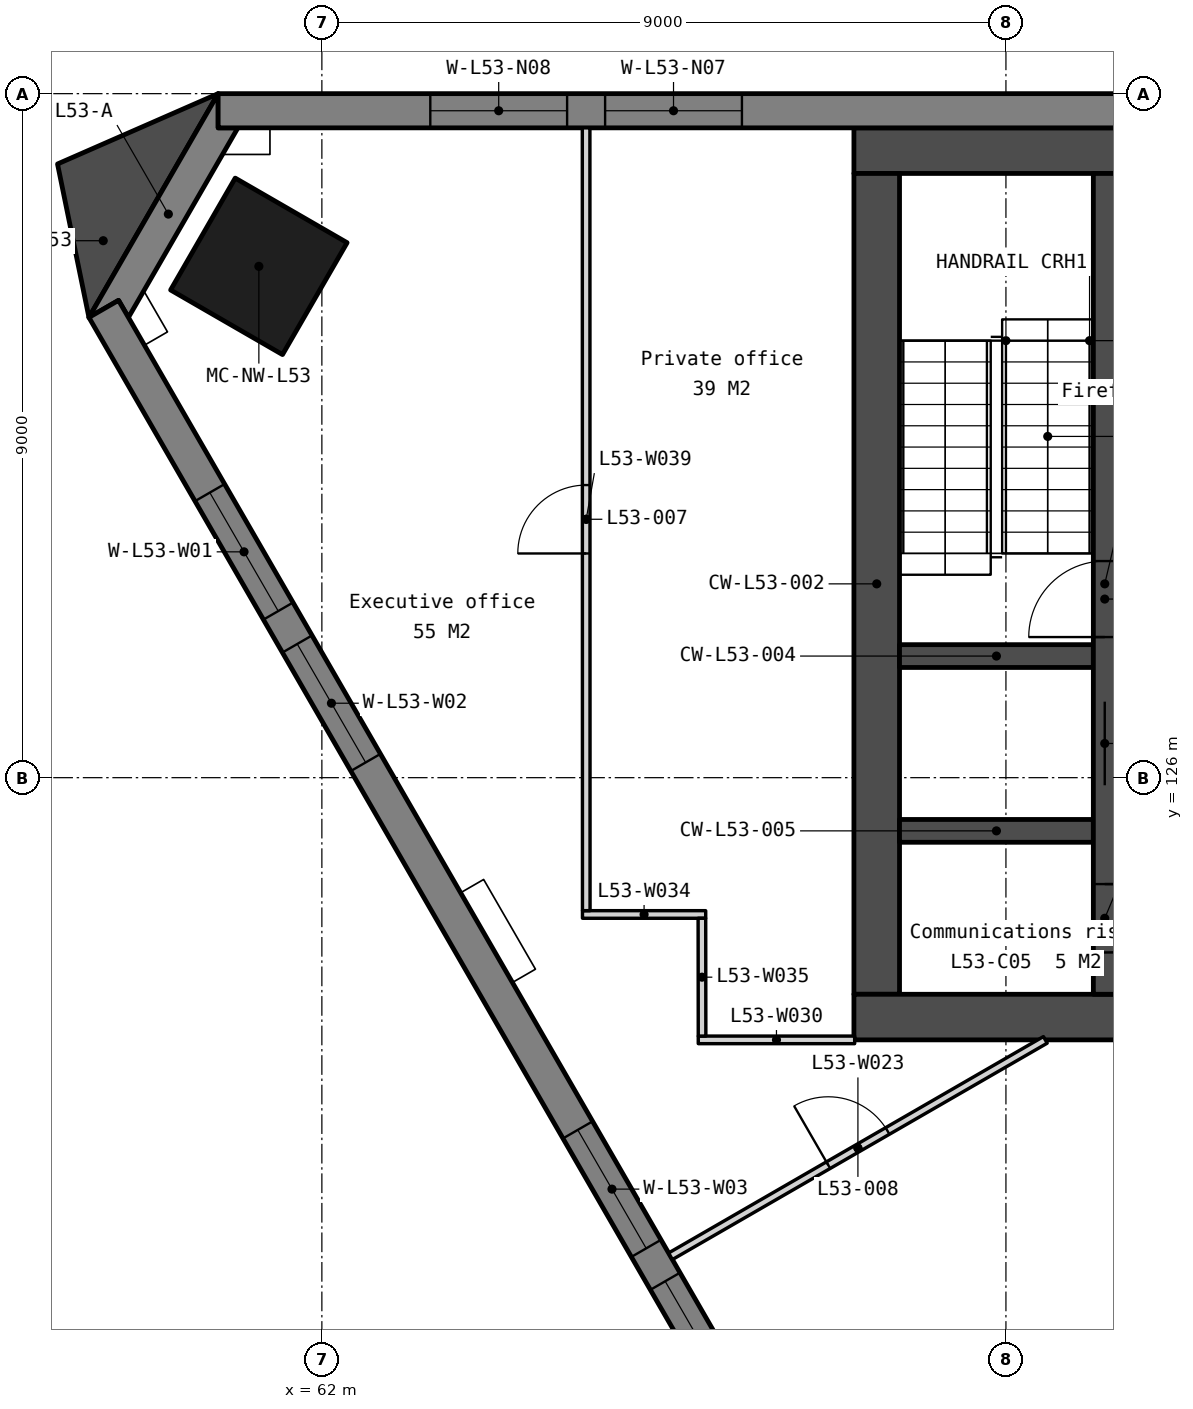
"""IFC4 building model, lengths in metres.
Left out: names, types, materials, properties, quantities, classifications, styles, units other than length and angle.
Written with IfcOpenShell. Run it as: python <this file> out.ifc"""

import sys

from ifc_helpers import new_model, si_unit, direction, frame, frame_2d, origin, origin_2d, place, context, subcontext, project, spatial, polyline, rectangle, outline, extrude, element, fill, save


model = new_model("IFC4")
c1 = context("Model", 3, precision=1e-05, world=origin(), true_north=direction((0.0, 1.0)))
c2 = subcontext(c1, "Body", "Model", "MODEL_VIEW")
j1 = project(units=[si_unit("LENGTHUNIT", "METRE"), si_unit("PLANEANGLEUNIT", "RADIAN")], contexts=[c1])
p1 = place(None, origin())
s1 = spatial("IfcSite", under=j1, at=p1, CompositionType="ELEMENT")
p2 = place(p1, origin())
s2 = spatial("IfcBuilding", under=s1, at=p2, CompositionType="ELEMENT")
p3 = place(p2, frame((0.0, 0.0, 211.4)))
s3 = spatial("IfcBuildingStorey", under=s2, at=p3, CompositionType="ELEMENT", Elevation=211.4)
p4 = place(p3, frame((61.171, 132.728, 0.0), z_axis=(0.0, 0.0, 1.0), x_axis=(-0.5, -0.866025403784, 0.0)))
e1 = element("IfcColumn", 1, at=p4, inside=s3, PredefinedType="COLUMN", context=c2, shape_type="SweptSolid", body=[
    extrude(rectangle(XDim=1.7, YDim=1.7, at=origin_2d()), origin(), (0.0, 0.0, 1.0), 3.9),
])
p5 = place(p3, frame((69.0, 134.25, 0.0), z_axis=(0.0, 0.0, 1.0), x_axis=(1.0, 0.0, 0.0)))
e2 = element("IfcWall", 2, at=p5, inside=s3, PredefinedType="SOLIDWALL", context=c2, shape_type="SweptSolid", body=[
    extrude(rectangle(XDim=22.0, YDim=0.6, at=frame_2d((11.0, 0.0))), origin(), (0.0, 0.0, 1.0), 3.75),
])
p6 = place(p3, frame((69.3, 133.95, 0.0), z_axis=(0.0, 0.0, 1.0), x_axis=(0.0, -1.0, 0.0)))
e3 = element("IfcWall", 3, at=p6, inside=s3, PredefinedType="SOLIDWALL", context=c2, shape_type="SweptSolid", body=[
    extrude(rectangle(XDim=10.8, YDim=0.6, at=frame_2d((5.4, 0.0))), origin(), (0.0, 0.0, 1.0), 3.75),
])
p7 = place(p3, frame((69.0, 122.85, 0.0), z_axis=(0.0, 0.0, 1.0), x_axis=(1.0, 0.0, 0.0)))
e4 = element("IfcWall", 4, at=p7, inside=s3, PredefinedType="SOLIDWALL", context=c2, shape_type="SweptSolid", body=[
    extrude(rectangle(XDim=22.0, YDim=0.6, at=frame_2d((11.0, 0.0))), origin(), (0.0, 0.0, 1.0), 3.75),
])
p8 = place(p7, frame((16.375, 0.0, 0.0)))
e5 = element("IfcOpeningElement", 5, at=p8, cuts=e4, PredefinedType="OPENING", context=c2, shape_type="SweptSolid", body=[
    extrude(rectangle(XDim=1.8, YDim=2.1, at=frame_2d((0.9, 1.05))), frame((0.0, 0.31, 0.0), z_axis=(0.0, -1.0, 0.0), x_axis=(1.0, 0.0, 0.0)), (0.0, 0.0, 1.0), 0.62),
])
p9 = place(p7, frame((3.825, 0.0, 0.0)))
e6 = element("IfcOpeningElement", 6, at=p9, cuts=e4, PredefinedType="OPENING", context=c2, shape_type="SweptSolid", body=[
    extrude(rectangle(XDim=1.8, YDim=2.1, at=frame_2d((0.9, 1.05))), frame((0.0, 0.31, 0.0), z_axis=(0.0, -1.0, 0.0), x_axis=(1.0, 0.0, 0.0)), (0.0, 0.0, 1.0), 0.62),
])
p10 = place(p7, frame((12.85, 0.0, 0.0)))
e7 = element("IfcOpeningElement", 7, at=p10, cuts=e4, PredefinedType="OPENING", context=c2, shape_type="SweptSolid", body=[
    extrude(rectangle(XDim=1.5, YDim=2.1, at=frame_2d((0.75, 1.05))), frame((0.0, 0.31, 0.0), z_axis=(0.0, -1.0, 0.0), x_axis=(1.0, 0.0, 0.0)), (0.0, 0.0, 1.0), 0.62),
])
for number, where, z_axis, x_axis in (
    (8, (69.6, 127.6, 0.0), (0.0, 0.0, 1.0), (1.0, 0.0, 0.0)),
    (9, (69.6, 125.3, 0.0), (0.0, 0.0, 1.0), (1.0, 0.0, 0.0)),
):
    element("IfcWall", number, at=place(p3, frame(where, z_axis=z_axis, x_axis=x_axis)), inside=s3, PredefinedType="SOLIDWALL", context=c2, shape_type="SweptSolid", body=[
        extrude(rectangle(XDim=2.55, YDim=0.3, at=frame_2d((1.275, 0.0))), origin(), (0.0, 0.0, 1.0), 3.75),
    ])
p11 = place(p3, frame((72.3, 133.95, 0.0), z_axis=(0.0, 0.0, 1.0), x_axis=(0.0, -1.0, 0.0)))
e10 = element("IfcWall", 10, at=p11, inside=s3, PredefinedType="SOLIDWALL", context=c2, shape_type="SweptSolid", body=[
    extrude(rectangle(XDim=10.8, YDim=0.3, at=frame_2d((5.4, 0.0))), origin(), (0.0, 0.0, 1.0), 3.75),
])
p12 = place(p11, frame((6.95, 0.0, 0.0)))
e11 = element("IfcOpeningElement", 11, at=p12, cuts=e10, PredefinedType="OPENING", context=c2, shape_type="SweptSolid", body=[
    extrude(rectangle(XDim=1.1, YDim=2.1, at=frame_2d((0.55, 1.05))), frame((0.0, 0.16, 0.0), z_axis=(0.0, -1.0, 0.0), x_axis=(1.0, 0.0, 0.0)), (0.0, 0.0, 1.0), 0.32),
])
p13 = place(p11, frame((9.35, 0.0, 0.0)))
e12 = element("IfcOpeningElement", 12, at=p13, cuts=e10, PredefinedType="OPENING", context=c2, shape_type="SweptSolid", body=[
    extrude(rectangle(XDim=0.9, YDim=2.1, at=frame_2d((0.45, 1.05))), frame((0.0, 0.16, 0.0), z_axis=(0.0, -1.0, 0.0), x_axis=(1.0, 0.0, 0.0)), (0.0, 0.0, 1.0), 0.32),
])
p14 = place(p11, frame((5.1, 0.0, 0.0)))
e13 = element("IfcOpeningElement", 13, at=p14, cuts=e10, PredefinedType="OPENING", context=c2, shape_type="SweptSolid", body=[
    extrude(rectangle(XDim=1.0, YDim=2.1, at=frame_2d((0.5, 1.05))), frame((0.0, 0.16, 0.0), z_axis=(0.0, -1.0, 0.0), x_axis=(1.0, 0.0, 0.0)), (0.0, 0.0, 1.0), 0.32),
])
p15 = place(p3, frame((0.0, 0.0, -0.15)))
e14 = element("IfcWall", 14, at=p15, inside=s3, PredefinedType="SOLIDWALL", context=c2, shape_type="SweptSolid", body=[
    extrude(outline(polyline([(60.635, 135.0), (60.635, 134.55), (60.895, 134.55), (59.455, 132.055), (59.325, 132.281), (58.935, 132.055), (60.635, 135.0)])), origin(), (0.0, 0.0, 1.0), 3.9),
])
p16 = place(p3, frame((99.365, 134.775, -0.15), z_axis=(0.0, 0.0, 1.0), x_axis=(-1.0, 0.0, 0.0)))
e15 = element("IfcWall", 15, at=p16, inside=s3, PredefinedType="SOLIDWALL", context=c2, shape_type="SweptSolid", body=[
    extrude(outline(polyline([(38.729, 0.0), (38.729, 3.9), (0.0, 3.9), (0.0, 0.0), (38.729, 0.0)])), frame((0.0, 0.225, 0.0), z_axis=(0.0, -1.0, 0.0), x_axis=(1.0, 0.0, 0.0)), (0.0, 0.0, 1.0), 0.45),
])
p17 = place(p16, frame((2.791, 0.0, 0.95)))
e16 = element("IfcOpeningElement", 16, at=p17, cuts=e15, PredefinedType="OPENING", context=c2, shape_type="SweptSolid", body=[
    extrude(rectangle(XDim=1.8, YDim=2.2, at=frame_2d((0.9, 1.1))), frame((0.0, 0.235, 0.0), z_axis=(0.0, -1.0, 0.0), x_axis=(1.0, 0.0, 0.0)), (0.0, 0.0, 1.0), 0.47),
])
p18 = place(p16, frame((5.091, 0.0, 0.95)))
e17 = element("IfcOpeningElement", 17, at=p18, cuts=e15, PredefinedType="OPENING", context=c2, shape_type="SweptSolid", body=[
    extrude(rectangle(XDim=1.8, YDim=2.2, at=frame_2d((0.9, 1.1))), frame((0.0, 0.235, 0.0), z_axis=(0.0, -1.0, 0.0), x_axis=(1.0, 0.0, 0.0)), (0.0, 0.0, 1.0), 0.47),
])
p19 = place(p16, frame((12.473, 0.0, 0.95)))
e18 = element("IfcOpeningElement", 18, at=p19, cuts=e15, PredefinedType="OPENING", context=c2, shape_type="SweptSolid", body=[
    extrude(rectangle(XDim=1.8, YDim=2.2, at=frame_2d((0.9, 1.1))), frame((0.0, 0.235, 0.0), z_axis=(0.0, -1.0, 0.0), x_axis=(1.0, 0.0, 0.0)), (0.0, 0.0, 1.0), 0.47),
])
p20 = place(p16, frame((14.773, 0.0, 0.95)))
e19 = element("IfcOpeningElement", 19, at=p20, cuts=e15, PredefinedType="OPENING", context=c2, shape_type="SweptSolid", body=[
    extrude(rectangle(XDim=1.8, YDim=2.2, at=frame_2d((0.9, 1.1))), frame((0.0, 0.235, 0.0), z_axis=(0.0, -1.0, 0.0), x_axis=(1.0, 0.0, 0.0)), (0.0, 0.0, 1.0), 0.47),
])
p21 = place(p16, frame((22.156, 0.0, 0.95)))
e20 = element("IfcOpeningElement", 20, at=p21, cuts=e15, PredefinedType="OPENING", context=c2, shape_type="SweptSolid", body=[
    extrude(rectangle(XDim=1.8, YDim=2.2, at=frame_2d((0.9, 1.1))), frame((0.0, 0.235, 0.0), z_axis=(0.0, -1.0, 0.0), x_axis=(1.0, 0.0, 0.0)), (0.0, 0.0, 1.0), 0.47),
])
p22 = place(p16, frame((24.456, 0.0, 0.95)))
e21 = element("IfcOpeningElement", 21, at=p22, cuts=e15, PredefinedType="OPENING", context=c2, shape_type="SweptSolid", body=[
    extrude(rectangle(XDim=1.8, YDim=2.2, at=frame_2d((0.9, 1.1))), frame((0.0, 0.235, 0.0), z_axis=(0.0, -1.0, 0.0), x_axis=(1.0, 0.0, 0.0)), (0.0, 0.0, 1.0), 0.47),
])
p23 = place(p16, frame((31.838, 0.0, 0.95)))
e22 = element("IfcOpeningElement", 22, at=p23, cuts=e15, PredefinedType="OPENING", context=c2, shape_type="SweptSolid", body=[
    extrude(rectangle(XDim=1.8, YDim=2.2, at=frame_2d((0.9, 1.1))), frame((0.0, 0.235, 0.0), z_axis=(0.0, -1.0, 0.0), x_axis=(1.0, 0.0, 0.0)), (0.0, 0.0, 1.0), 0.47),
])
p24 = place(p16, frame((34.138, 0.0, 0.95)))
e23 = element("IfcOpeningElement", 23, at=p24, cuts=e15, PredefinedType="OPENING", context=c2, shape_type="SweptSolid", body=[
    extrude(rectangle(XDim=1.8, YDim=2.2, at=frame_2d((0.9, 1.1))), frame((0.0, 0.235, 0.0), z_axis=(0.0, -1.0, 0.0), x_axis=(1.0, 0.0, 0.0)), (0.0, 0.0, 1.0), 0.47),
])
p25 = place(p3, frame((59.13, 132.168, -0.15), z_axis=(0.0, 0.0, 1.0), x_axis=(0.500002199942, -0.866024133644, 0.0)))
e24 = element("IfcWall", 24, at=p25, inside=s3, PredefinedType="SOLIDWALL", context=c2, shape_type="SweptSolid", body=[
    extrude(outline(polyline([(38.729, 0.0), (38.729, 3.9), (0.0, 3.9), (0.0, 0.0), (38.729, 0.0)])), frame((0.0, 0.225, 0.0), z_axis=(0.0, -1.0, 0.0), x_axis=(1.0, 0.0, 0.0)), (0.0, 0.0, 1.0), 0.45),
])
p26 = place(p25, frame((2.791, 0.0, 0.95)))
e25 = element("IfcOpeningElement", 25, at=p26, cuts=e24, PredefinedType="OPENING", context=c2, shape_type="SweptSolid", body=[
    extrude(rectangle(XDim=1.8, YDim=2.2, at=frame_2d((0.9, 1.1))), frame((0.0, 0.235, 0.0), z_axis=(0.0, -1.0, 0.0), x_axis=(1.0, 0.0, 0.0)), (0.0, 0.0, 1.0), 0.47),
])
p27 = place(p25, frame((5.091, 0.0, 0.95)))
e26 = element("IfcOpeningElement", 26, at=p27, cuts=e24, PredefinedType="OPENING", context=c2, shape_type="SweptSolid", body=[
    extrude(rectangle(XDim=1.8, YDim=2.2, at=frame_2d((0.9, 1.1))), frame((0.0, 0.235, 0.0), z_axis=(0.0, -1.0, 0.0), x_axis=(1.0, 0.0, 0.0)), (0.0, 0.0, 1.0), 0.47),
])
p28 = place(p25, frame((12.473, 0.0, 0.95)))
e27 = element("IfcOpeningElement", 27, at=p28, cuts=e24, PredefinedType="OPENING", context=c2, shape_type="SweptSolid", body=[
    extrude(rectangle(XDim=1.8, YDim=2.2, at=frame_2d((0.9, 1.1))), frame((0.0, 0.235, 0.0), z_axis=(0.0, -1.0, 0.0), x_axis=(1.0, 0.0, 0.0)), (0.0, 0.0, 1.0), 0.47),
])
p29 = place(p25, frame((14.773, 0.0, 0.95)))
e28 = element("IfcOpeningElement", 28, at=p29, cuts=e24, PredefinedType="OPENING", context=c2, shape_type="SweptSolid", body=[
    extrude(rectangle(XDim=1.8, YDim=2.2, at=frame_2d((0.9, 1.1))), frame((0.0, 0.235, 0.0), z_axis=(0.0, -1.0, 0.0), x_axis=(1.0, 0.0, 0.0)), (0.0, 0.0, 1.0), 0.47),
])
p30 = place(p25, frame((22.156, 0.0, 0.95)))
e29 = element("IfcOpeningElement", 29, at=p30, cuts=e24, PredefinedType="OPENING", context=c2, shape_type="SweptSolid", body=[
    extrude(rectangle(XDim=1.8, YDim=2.2, at=frame_2d((0.9, 1.1))), frame((0.0, 0.235, 0.0), z_axis=(0.0, -1.0, 0.0), x_axis=(1.0, 0.0, 0.0)), (0.0, 0.0, 1.0), 0.47),
])
p31 = place(p25, frame((24.456, 0.0, 0.95)))
e30 = element("IfcOpeningElement", 30, at=p31, cuts=e24, PredefinedType="OPENING", context=c2, shape_type="SweptSolid", body=[
    extrude(rectangle(XDim=1.8, YDim=2.2, at=frame_2d((0.9, 1.1))), frame((0.0, 0.235, 0.0), z_axis=(0.0, -1.0, 0.0), x_axis=(1.0, 0.0, 0.0)), (0.0, 0.0, 1.0), 0.47),
])
p32 = place(p25, frame((31.838, 0.0, 0.95)))
e31 = element("IfcOpeningElement", 31, at=p32, cuts=e24, PredefinedType="OPENING", context=c2, shape_type="SweptSolid", body=[
    extrude(rectangle(XDim=1.8, YDim=2.2, at=frame_2d((0.9, 1.1))), frame((0.0, 0.235, 0.0), z_axis=(0.0, -1.0, 0.0), x_axis=(1.0, 0.0, 0.0)), (0.0, 0.0, 1.0), 0.47),
])
p33 = place(p25, frame((34.138, 0.0, 0.95)))
e32 = element("IfcOpeningElement", 32, at=p33, cuts=e24, PredefinedType="OPENING", context=c2, shape_type="SweptSolid", body=[
    extrude(rectangle(XDim=1.8, YDim=2.2, at=frame_2d((0.9, 1.1))), frame((0.0, 0.235, 0.0), z_axis=(0.0, -1.0, 0.0), x_axis=(1.0, 0.0, 0.0)), (0.0, 0.0, 1.0), 0.47),
])
p34 = place(p3, frame((0.0, 0.0, -0.15)))
e33 = element("IfcWall", 33, at=p34, inside=s3, PredefinedType="SOLIDWALL", context=c2, shape_type="SweptSolid", body=[
    extrude(outline(polyline([(60.635, 135.0), (58.522, 134.075), (58.935, 132.055), (60.635, 135.0)])), origin(), (0.0, 0.0, 1.0), 3.9),
])
p35 = place(p3, frame((69.007, 115.51, 0.0), z_axis=(0.0, 0.0, 1.0), x_axis=(0.866033739143, 0.499985562458, 0.0)))
e34 = element("IfcWall", 34, at=p35, inside=s3, PredefinedType="PARTITIONING", context=c2, shape_type="SweptSolid", body=[
    extrude(rectangle(XDim=8.594, YDim=0.2, at=frame_2d((4.297, 0.0))), origin(), (0.0, 0.0, 1.0), 3.75),
])
p36 = place(p3, frame((66.587, 119.703, 0.0), z_axis=(0.0, 0.0, 1.0), x_axis=(0.866023511746, 0.500003277092, 0.0)))
e35 = element("IfcWall", 35, at=p36, inside=s3, PredefinedType="PARTITIONING", context=c2, shape_type="SweptSolid", body=[
    extrude(rectangle(XDim=5.694, YDim=0.1, at=frame_2d((2.847, 0.0))), origin(), (0.0, 0.0, 1.0), 3.75),
])
p37 = place(p36, frame((2.397, 0.0, 0.0)))
e36 = element("IfcOpeningElement", 36, at=p37, cuts=e35, PredefinedType="OPENING", context=c2, shape_type="SweptSolid", body=[
    extrude(rectangle(XDim=0.9, YDim=2.1, at=frame_2d((0.45, 1.05))), frame((0.0, 0.06, 0.0), z_axis=(0.0, -1.0, 0.0), x_axis=(1.0, 0.0, 0.0)), (0.0, 0.0, 1.0), 0.12),
])
p38 = place(p3, frame((66.952, 122.55, 0.0), z_axis=(0.0, 0.0, 1.0), x_axis=(1.0, 0.0, 0.0)))
e37 = element("IfcWall", 37, at=p38, inside=s3, PredefinedType="PARTITIONING", context=c2, shape_type="SweptSolid", body=[
    extrude(rectangle(XDim=2.058, YDim=0.1, at=frame_2d((1.029, 0.0))), origin(), (0.0, 0.0, 1.0), 3.75),
])
p39 = place(p3, frame((65.428, 124.2, 0.0), z_axis=(0.0, 0.0, 1.0), x_axis=(1.0, 0.0, 0.0)))
e38 = element("IfcWall", 38, at=p39, inside=s3, PredefinedType="PARTITIONING", context=c2, shape_type="SweptSolid", body=[
    extrude(rectangle(XDim=1.622, YDim=0.1, at=frame_2d((0.811, 0.0))), origin(), (0.0, 0.0, 1.0), 3.28),
])
p40 = place(p3, frame((67.002, 122.6, 0.0), z_axis=(0.0, 0.0, 1.0), x_axis=(-0.001260238445, 0.999999205899, 0.0)))
e39 = element("IfcWall", 39, at=p40, inside=s3, PredefinedType="PARTITIONING", context=c2, shape_type="SweptSolid", body=[
    extrude(rectangle(XDim=1.55, YDim=0.1, at=frame_2d((0.775, 0.0))), origin(), (0.0, 0.0, 1.0), 3.75),
])
p41 = place(p3, frame((65.479, 124.25, 0.0), z_axis=(0.0, 0.0, 1.0), x_axis=(-0.000189622884, 0.999999982022, 0.0)))
e40 = element("IfcWall", 40, at=p41, inside=s3, PredefinedType="PARTITIONING", context=c2, shape_type="SweptSolid", body=[
    extrude(rectangle(XDim=10.3, YDim=0.1, at=frame_2d((5.15, 0.0))), origin(), (0.0, 0.0, 1.0), 3.75),
])
p42 = place(p41, frame((4.7, 0.0, 0.0)))
e41 = element("IfcOpeningElement", 41, at=p42, cuts=e40, PredefinedType="OPENING", context=c2, shape_type="SweptSolid", body=[
    extrude(rectangle(XDim=0.9, YDim=2.1, at=frame_2d((0.45, 1.05))), frame((0.0, 0.06, 0.0), z_axis=(0.0, -1.0, 0.0), x_axis=(1.0, 0.0, 0.0)), (0.0, 0.0, 1.0), 0.12),
])
p43 = place(p12, origin())
e42 = element("IfcDoor", 42, at=p43, inside=s3, OperationType="SLIDING_TO_LEFT", PredefinedType="DOOR", context=c2, shape_type="SweptSolid", body=[
    extrude(rectangle(XDim=1.1, YDim=2.1, at=frame_2d((0.55, 1.05))), frame((0.0, 0.025, 0.0), z_axis=(0.0, -1.0, 0.0), x_axis=(1.0, 0.0, 0.0)), (0.0, 0.0, 1.0), 0.05),
])
fill(e11, e42)
p44 = place(p13, origin())
e43 = element("IfcDoor", 43, at=p44, inside=s3, OperationType="SINGLE_SWING_LEFT", PredefinedType="DOOR", context=c2, shape_type="SweptSolid", body=[
    extrude(rectangle(XDim=0.9, YDim=2.1, at=frame_2d((0.45, 1.05))), frame((0.0, 0.025, 0.0), z_axis=(0.0, -1.0, 0.0), x_axis=(1.0, 0.0, 0.0)), (0.0, 0.0, 1.0), 0.05),
])
fill(e12, e43)
p45 = place(p14, origin())
e44 = element("IfcDoor", 44, at=p45, inside=s3, OperationType="SINGLE_SWING_RIGHT", PredefinedType="DOOR", context=c2, shape_type="SweptSolid", body=[
    extrude(rectangle(XDim=1.0, YDim=2.1, at=frame_2d((0.5, 1.05))), frame((0.0, 0.025, 0.0), z_axis=(0.0, -1.0, 0.0), x_axis=(1.0, 0.0, 0.0)), (0.0, 0.0, 1.0), 0.05),
])
fill(e13, e44)
p46 = place(p23, origin())
e45 = element("IfcWindow", 45, at=p46, inside=s3, PartitioningType="SINGLE_PANEL", PredefinedType="WINDOW", context=c2, shape_type="SweptSolid", body=[
    extrude(rectangle(XDim=1.8, YDim=2.2, at=frame_2d((0.9, 1.1))), frame((0.0, 0.03, 0.0), z_axis=(0.0, -1.0, 0.0), x_axis=(1.0, 0.0, 0.0)), (0.0, 0.0, 1.0), 0.06),
])
fill(e22, e45)
p47 = place(p24, origin())
e46 = element("IfcWindow", 46, at=p47, inside=s3, PartitioningType="SINGLE_PANEL", PredefinedType="WINDOW", context=c2, shape_type="SweptSolid", body=[
    extrude(rectangle(XDim=1.8, YDim=2.2, at=frame_2d((0.9, 1.1))), frame((0.0, 0.03, 0.0), z_axis=(0.0, -1.0, 0.0), x_axis=(1.0, 0.0, 0.0)), (0.0, 0.0, 1.0), 0.06),
])
fill(e23, e46)
p48 = place(p26, origin())
e47 = element("IfcWindow", 47, at=p48, inside=s3, PartitioningType="SINGLE_PANEL", PredefinedType="WINDOW", context=c2, shape_type="SweptSolid", body=[
    extrude(rectangle(XDim=1.8, YDim=2.2, at=frame_2d((0.9, 1.1))), frame((0.0, 0.03, 0.0), z_axis=(0.0, -1.0, 0.0), x_axis=(1.0, 0.0, 0.0)), (0.0, 0.0, 1.0), 0.06),
])
fill(e25, e47)
p49 = place(p27, origin())
e48 = element("IfcWindow", 48, at=p49, inside=s3, PartitioningType="SINGLE_PANEL", PredefinedType="WINDOW", context=c2, shape_type="SweptSolid", body=[
    extrude(rectangle(XDim=1.8, YDim=2.2, at=frame_2d((0.9, 1.1))), frame((0.0, 0.03, 0.0), z_axis=(0.0, -1.0, 0.0), x_axis=(1.0, 0.0, 0.0)), (0.0, 0.0, 1.0), 0.06),
])
fill(e26, e48)
p50 = place(p28, origin())
e49 = element("IfcWindow", 49, at=p50, inside=s3, PartitioningType="SINGLE_PANEL", PredefinedType="WINDOW", context=c2, shape_type="SweptSolid", body=[
    extrude(rectangle(XDim=1.8, YDim=2.2, at=frame_2d((0.9, 1.1))), frame((0.0, 0.03, 0.0), z_axis=(0.0, -1.0, 0.0), x_axis=(1.0, 0.0, 0.0)), (0.0, 0.0, 1.0), 0.06),
])
fill(e27, e49)
p51 = place(p29, origin())
e50 = element("IfcWindow", 50, at=p51, inside=s3, PartitioningType="SINGLE_PANEL", PredefinedType="WINDOW", context=c2, shape_type="SweptSolid", body=[
    extrude(rectangle(XDim=1.8, YDim=2.2, at=frame_2d((0.9, 1.1))), frame((0.0, 0.03, 0.0), z_axis=(0.0, -1.0, 0.0), x_axis=(1.0, 0.0, 0.0)), (0.0, 0.0, 1.0), 0.06),
])
fill(e28, e50)
p52 = place(p42, origin())
e51 = element("IfcDoor", 51, at=p52, inside=s3, OperationType="SINGLE_SWING_LEFT", PredefinedType="DOOR", context=c2, shape_type="SweptSolid", body=[
    extrude(rectangle(XDim=0.9, YDim=2.1, at=frame_2d((0.45, 1.05))), frame((0.0, 0.025, 0.0), z_axis=(0.0, -1.0, 0.0), x_axis=(1.0, 0.0, 0.0)), (0.0, 0.0, 1.0), 0.05),
])
fill(e41, e51)
p53 = place(p37, origin())
e52 = element("IfcDoor", 52, at=p53, inside=s3, OperationType="SINGLE_SWING_LEFT", PredefinedType="DOOR", context=c2, shape_type="SweptSolid", body=[
    extrude(rectangle(XDim=0.9, YDim=2.1, at=frame_2d((0.45, 1.05))), frame((0.0, 0.025, 0.0), z_axis=(0.0, -1.0, 0.0), x_axis=(1.0, 0.0, 0.0)), (0.0, 0.0, 1.0), 0.05),
])
fill(e36, e52)
save(model, sys.argv[1])
